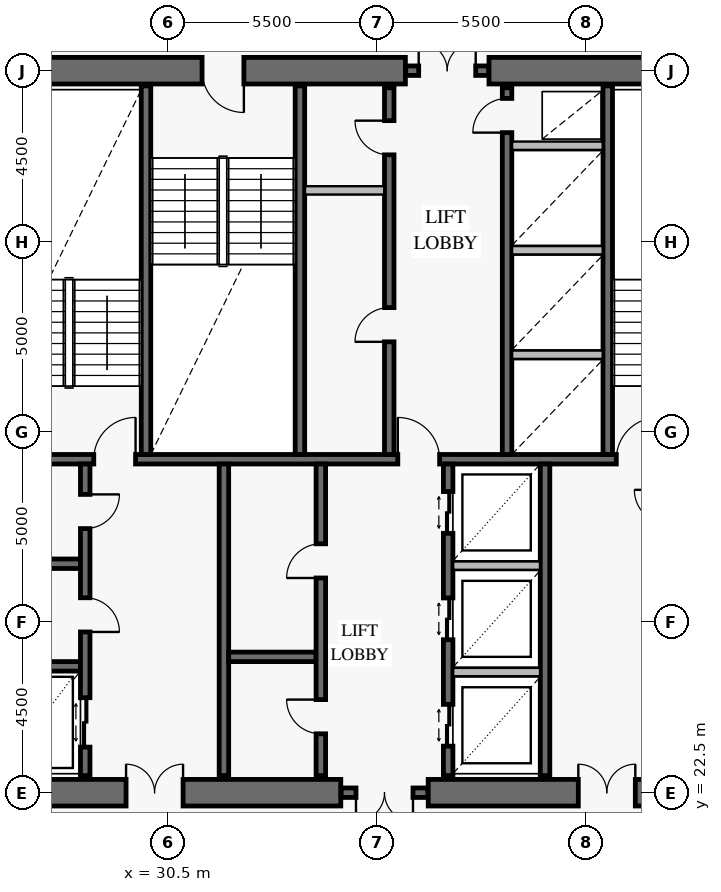
"""IFC4 building model, lengths in metres.
Left out: names, types, materials, properties, quantities, classifications, styles, units other than length and angle.
Written with IfcOpenShell. Run it as: python <this file> out.ifc"""

import sys

from ifc_helpers import new_model, si_unit, direction, frame, frame_2d, origin, place, context, subcontext, project, spatial, rectangle, extrude, element, fill, save


model = new_model("IFC4")
c1 = context("Model", 3, precision=1e-05, world=origin(), true_north=direction((0.0, 1.0)))
c2 = subcontext(c1, "Body", "Model", "MODEL_VIEW")
j1 = project(units=[si_unit("LENGTHUNIT", "METRE"), si_unit("PLANEANGLEUNIT", "RADIAN")], contexts=[c1])
p1 = place(None, origin())
s1 = spatial("IfcSite", under=j1, at=p1, CompositionType="ELEMENT")
p2 = place(p1, origin())
s2 = spatial("IfcBuilding", under=s1, at=p2, CompositionType="ELEMENT")
p3 = place(p2, frame((0.0, 0.0, 207.4)))
s3 = spatial("IfcBuildingStorey", under=s2, at=p3, CompositionType="ELEMENT", Elevation=207.4)
p4 = place(p3, frame((25.15, 22.5, 0.0), z_axis=(0.0, 0.0, 1.0), x_axis=(1.0, 0.0, 0.0)))
e1 = element("IfcWall", 1, at=p4, inside=s3, PredefinedType="SHEAR", context=c2, shape_type="SweptSolid", body=[
    extrude(rectangle(XDim=9.9, YDim=0.7, at=frame_2d((4.95, 0.0))), origin(), (0.0, 0.0, 1.0), 3.8),
])
p5 = place(p4, frame((4.25, 0.0, 0.0)))
e2 = element("IfcOpeningElement", 2, at=p5, cuts=e1, PredefinedType="OPENING", context=c2, shape_type="SweptSolid", body=[
    extrude(rectangle(XDim=1.5, YDim=2.15, at=frame_2d((0.75, 1.075))), frame((0.0, 0.362, 0.0), z_axis=(0.0, -1.0, 0.0), x_axis=(1.0, 0.0, 0.0)), (0.0, 0.0, 1.0), 0.724),
])
p6 = place(p3, frame((37.35, 22.5, 0.0), z_axis=(0.0, 0.0, 1.0), x_axis=(1.0, 0.0, 0.0)))
e3 = element("IfcWall", 3, at=p6, inside=s3, PredefinedType="SHEAR", context=c2, shape_type="SweptSolid", body=[
    extrude(rectangle(XDim=9.5, YDim=0.7, at=frame_2d((4.75, 0.0))), origin(), (0.0, 0.0, 1.0), 3.8),
])
p7 = place(p6, frame((3.95, 0.0, 0.0)))
e4 = element("IfcOpeningElement", 4, at=p7, cuts=e3, PredefinedType="OPENING", context=c2, shape_type="SweptSolid", body=[
    extrude(rectangle(XDim=1.5, YDim=2.15, at=frame_2d((0.75, 1.075))), frame((0.0, 0.362, 0.0), z_axis=(0.0, -1.0, 0.0), x_axis=(1.0, 0.0, 0.0)), (0.0, 0.0, 1.0), 0.724),
])
p8 = place(p3, frame((46.85, 41.5, 0.0), z_axis=(0.0, 0.0, 1.0), x_axis=(-1.0, 0.0, 0.0)))
e5 = element("IfcWall", 5, at=p8, inside=s3, PredefinedType="SHEAR", context=c2, shape_type="SweptSolid", body=[
    extrude(rectangle(XDim=7.9, YDim=0.7, at=frame_2d((3.95, 0.0))), origin(), (0.0, 0.0, 1.0), 3.8),
])
p9 = place(p3, frame((36.75, 41.5, 0.0), z_axis=(0.0, 0.0, 1.0), x_axis=(-1.0, 0.0, 0.0)))
e6 = element("IfcWall", 6, at=p9, inside=s3, PredefinedType="SHEAR", context=c2, shape_type="SweptSolid", body=[
    extrude(rectangle(XDim=11.6, YDim=0.7, at=frame_2d((5.8, 0.0))), origin(), (0.0, 0.0, 1.0), 3.8),
])
p10 = place(p9, frame((4.25, 0.0, 0.0)))
e7 = element("IfcOpeningElement", 7, at=p10, cuts=e6, PredefinedType="OPENING", context=c2, shape_type="SweptSolid", body=[
    extrude(rectangle(XDim=1.1, YDim=2.15, at=frame_2d((0.55, 1.075))), frame((0.0, 0.362, 0.0), z_axis=(0.0, -1.0, 0.0), x_axis=(1.0, 0.0, 0.0)), (0.0, 0.0, 1.0), 0.724),
])
p11 = place(p3, frame((35.06, 22.5, 0.0), z_axis=(0.0, 0.0, 1.0), x_axis=(1.0, 0.0, 0.0)))
e8 = element("IfcWall", 8, at=p11, inside=s3, PredefinedType="SOLIDWALL", context=c2, shape_type="SweptSolid", body=[
    extrude(rectangle(XDim=2.28, YDim=0.25, at=frame_2d((1.14, 0.0))), origin(), (0.0, 0.0, 1.0), 3.8),
])
p12 = place(p11, frame((0.39, 0.0, 0.0)))
e9 = element("IfcOpeningElement", 9, at=p12, cuts=e8, PredefinedType="OPENING", context=c2, shape_type="SweptSolid", body=[
    extrude(rectangle(XDim=1.5, YDim=2.15, at=frame_2d((0.75, 1.075))), frame((0.0, 0.137, 0.0), z_axis=(0.0, -1.0, 0.0), x_axis=(1.0, 0.0, 0.0)), (0.0, 0.0, 1.0), 0.274),
])
p13 = place(p3, frame((36.76, 41.5, 0.0), z_axis=(0.0, 0.0, 1.0), x_axis=(1.0, 0.0, 0.0)))
e10 = element("IfcWall", 10, at=p13, inside=s3, PredefinedType="SOLIDWALL", context=c2, shape_type="SweptSolid", body=[
    extrude(rectangle(XDim=2.18, YDim=0.25, at=frame_2d((1.09, 0.0))), origin(), (0.0, 0.0, 1.0), 3.8),
])
p14 = place(p13, frame((0.34, 0.0, 0.0)))
e11 = element("IfcOpeningElement", 11, at=p14, cuts=e10, PredefinedType="OPENING", context=c2, shape_type="SweptSolid", body=[
    extrude(rectangle(XDim=1.5, YDim=2.15, at=frame_2d((0.75, 1.075))), frame((0.0, 0.137, 0.0), z_axis=(0.0, -1.0, 0.0), x_axis=(1.0, 0.0, 0.0)), (0.0, 0.0, 1.0), 0.274),
])
p15 = place(p3, frame((25.95, 31.275, 0.0), z_axis=(0.0, 0.0, 1.0), x_axis=(1.0, 0.0, 0.0)))
e12 = element("IfcWall", 12, at=p15, inside=s3, PredefinedType="SOLIDWALL", context=c2, shape_type="SweptSolid", body=[
    extrude(rectangle(XDim=20.1, YDim=0.25, at=frame_2d((10.05, 0.0))), origin(), (0.0, 0.0, 1.0), 3.8),
])
p16 = place(p15, frame((2.6, 0.0, 0.0)))
e13 = element("IfcOpeningElement", 13, at=p16, cuts=e12, PredefinedType="OPENING", context=c2, shape_type="SweptSolid", body=[
    extrude(rectangle(XDim=1.1, YDim=2.15, at=frame_2d((0.55, 1.075))), frame((0.0, 0.137, 0.0), z_axis=(0.0, -1.0, 0.0), x_axis=(1.0, 0.0, 0.0)), (0.0, 0.0, 1.0), 0.274),
])
p17 = place(p15, frame((10.6, 0.0, 0.0)))
e14 = element("IfcOpeningElement", 14, at=p17, cuts=e12, PredefinedType="OPENING", context=c2, shape_type="SweptSolid", body=[
    extrude(rectangle(XDim=1.1, YDim=2.15, at=frame_2d((0.55, 1.075))), frame((0.0, 0.137, 0.0), z_axis=(0.0, -1.0, 0.0), x_axis=(1.0, 0.0, 0.0)), (0.0, 0.0, 1.0), 0.274),
])
p18 = place(p15, frame((16.35, 0.0, 0.0)))
e15 = element("IfcOpeningElement", 15, at=p18, cuts=e12, PredefinedType="OPENING", context=c2, shape_type="SweptSolid", body=[
    extrude(rectangle(XDim=1.1, YDim=2.15, at=frame_2d((0.55, 1.075))), frame((0.0, 0.137, 0.0), z_axis=(0.0, -1.0, 0.0), x_axis=(1.0, 0.0, 0.0)), (0.0, 0.0, 1.0), 0.274),
])
for number, where, z_axis, x_axis in (
    (16, (29.925, 31.4, 0.0), (0.0, 0.0, 1.0), (0.0, 1.0, 0.0)),
    (17, (33.975, 31.4, 0.0), (0.0, 0.0, 1.0), (0.0, 1.0, 0.0)),
    (18, (42.075, 31.4, 0.0), (0.0, 0.0, 1.0), (0.0, 1.0, 0.0)),
):
    element("IfcWall", number, at=place(p3, frame(where, z_axis=z_axis, x_axis=x_axis)), inside=s3, PredefinedType="SOLIDWALL", context=c2, shape_type="SweptSolid", body=[
        extrude(rectangle(XDim=9.7, YDim=0.25, at=frame_2d((4.85, 0.0))), origin(), (0.0, 0.0, 1.0), 3.8),
    ])
p19 = place(p3, frame((36.325, 31.4, 0.0), z_axis=(0.0, 0.0, 1.0), x_axis=(0.0, 1.0, 0.0)))
e19 = element("IfcWall", 19, at=p19, inside=s3, PredefinedType="SOLIDWALL", context=c2, shape_type="SweptSolid", body=[
    extrude(rectangle(XDim=9.65, YDim=0.25, at=frame_2d((4.825, 0.0))), origin(), (0.0, 0.0, 1.0), 3.8),
])
p20 = place(p19, frame((2.965, 0.0, 0.0)))
e20 = element("IfcOpeningElement", 20, at=p20, cuts=e19, PredefinedType="OPENING", context=c2, shape_type="SweptSolid", body=[
    extrude(rectangle(XDim=0.9, YDim=2.1, at=frame_2d((0.45, 1.05))), frame((0.0, 0.137, 0.0), z_axis=(0.0, -1.0, 0.0), x_axis=(1.0, 0.0, 0.0)), (0.0, 0.0, 1.0), 0.274),
])
p21 = place(p19, frame((7.885, 0.0, 0.0)))
e21 = element("IfcOpeningElement", 21, at=p21, cuts=e19, PredefinedType="OPENING", context=c2, shape_type="SweptSolid", body=[
    extrude(rectangle(XDim=0.9, YDim=2.1, at=frame_2d((0.45, 1.05))), frame((0.0, 0.137, 0.0), z_axis=(0.0, -1.0, 0.0), x_axis=(1.0, 0.0, 0.0)), (0.0, 0.0, 1.0), 0.274),
])
p22 = place(p3, frame((39.425, 31.4, 0.0), z_axis=(0.0, 0.0, 1.0), x_axis=(0.0, 1.0, 0.0)))
e22 = element("IfcWall", 22, at=p22, inside=s3, PredefinedType="SOLIDWALL", context=c2, shape_type="SweptSolid", body=[
    extrude(rectangle(XDim=9.65, YDim=0.25, at=frame_2d((4.825, 0.0))), origin(), (0.0, 0.0, 1.0), 3.8),
])
p23 = place(p22, frame((8.47, 0.0, 0.0)))
e23 = element("IfcOpeningElement", 23, at=p23, cuts=e22, PredefinedType="OPENING", context=c2, shape_type="SweptSolid", body=[
    extrude(rectangle(XDim=0.9, YDim=2.1, at=frame_2d((0.45, 1.05))), frame((0.0, 0.137, 0.0), z_axis=(0.0, -1.0, 0.0), x_axis=(1.0, 0.0, 0.0)), (0.0, 0.0, 1.0), 0.274),
])
for number, where, z_axis, x_axis in (
    (24, (25.95, 25.825, 0.0), (0.0, 0.0, 1.0), (1.0, 0.0, 0.0)),
    (25, (25.95, 28.525, 0.0), (0.0, 0.0, 1.0), (1.0, 0.0, 0.0)),
):
    element("IfcWall", number, at=place(p3, frame(where, z_axis=z_axis, x_axis=x_axis)), inside=s3, PredefinedType="SOLIDWALL", context=c2, shape_type="SweptSolid", body=[
        extrude(rectangle(XDim=2.25, YDim=0.25, at=frame_2d((1.125, 0.0))), origin(), (0.0, 0.0, 1.0), 3.8),
    ])
p24 = place(p3, frame((28.325, 22.95, 0.0), z_axis=(0.0, 0.0, 1.0), x_axis=(0.0, 1.0, 0.0)))
e26 = element("IfcWall", 26, at=p24, inside=s3, PredefinedType="SOLIDWALL", context=c2, shape_type="SweptSolid", body=[
    extrude(rectangle(XDim=8.2, YDim=0.25, at=frame_2d((4.1, 0.0))), origin(), (0.0, 0.0, 1.0), 3.8),
])
p25 = place(p24, frame((0.75, 0.0, 0.0)))
e27 = element("IfcOpeningElement", 27, at=p25, cuts=e26, PredefinedType="OPENING", context=c2, shape_type="SweptSolid", body=[
    extrude(rectangle(XDim=1.3, YDim=2.3, at=frame_2d((0.65, 1.15))), frame((0.0, 0.137, 0.0), z_axis=(0.0, -1.0, 0.0), x_axis=(1.0, 0.0, 0.0)), (0.0, 0.0, 1.0), 0.274),
])
p26 = place(p24, frame((3.78, 0.0, 0.0)))
e28 = element("IfcOpeningElement", 28, at=p26, cuts=e26, PredefinedType="OPENING", context=c2, shape_type="SweptSolid", body=[
    extrude(rectangle(XDim=0.9, YDim=2.1, at=frame_2d((0.45, 1.05))), frame((0.0, 0.137, 0.0), z_axis=(0.0, -1.0, 0.0), x_axis=(1.0, 0.0, 0.0)), (0.0, 0.0, 1.0), 0.274),
])
p27 = place(p24, frame((6.5, 0.0, 0.0)))
e29 = element("IfcOpeningElement", 29, at=p27, cuts=e26, PredefinedType="OPENING", context=c2, shape_type="SweptSolid", body=[
    extrude(rectangle(XDim=0.9, YDim=2.1, at=frame_2d((0.45, 1.05))), frame((0.0, 0.137, 0.0), z_axis=(0.0, -1.0, 0.0), x_axis=(1.0, 0.0, 0.0)), (0.0, 0.0, 1.0), 0.274),
])
p28 = place(p3, frame((31.975, 22.95, 0.0), z_axis=(0.0, 0.0, 1.0), x_axis=(0.0, 1.0, 0.0)))
e30 = element("IfcWall", 30, at=p28, inside=s3, PredefinedType="SOLIDWALL", context=c2, shape_type="SweptSolid", body=[
    extrude(rectangle(XDim=8.2, YDim=0.25, at=frame_2d((4.1, 0.0))), origin(), (0.0, 0.0, 1.0), 3.8),
])
p29 = place(p3, frame((32.1, 26.075, 0.0), z_axis=(0.0, 0.0, 1.0), x_axis=(1.0, 0.0, 0.0)))
e31 = element("IfcWall", 31, at=p29, inside=s3, PredefinedType="SOLIDWALL", context=c2, shape_type="SweptSolid", body=[
    extrude(rectangle(XDim=2.3, YDim=0.25, at=frame_2d((1.15, 0.0))), origin(), (0.0, 0.0, 1.0), 3.8),
])
p30 = place(p3, frame((34.525, 22.95, 0.0), z_axis=(0.0, 0.0, 1.0), x_axis=(0.0, 1.0, 0.0)))
e32 = element("IfcWall", 32, at=p30, inside=s3, PredefinedType="SOLIDWALL", context=c2, shape_type="SweptSolid", body=[
    extrude(rectangle(XDim=8.2, YDim=0.25, at=frame_2d((4.1, 0.0))), origin(), (0.0, 0.0, 1.0), 3.8),
])
p31 = place(p30, frame((1.1, 0.0, 0.0)))
e33 = element("IfcOpeningElement", 33, at=p31, cuts=e32, PredefinedType="OPENING", context=c2, shape_type="SweptSolid", body=[
    extrude(rectangle(XDim=0.9, YDim=2.1, at=frame_2d((0.45, 1.05))), frame((0.0, 0.137, 0.0), z_axis=(0.0, -1.0, 0.0), x_axis=(1.0, 0.0, 0.0)), (0.0, 0.0, 1.0), 0.274),
])
p32 = place(p30, frame((5.2, 0.0, 0.0)))
e34 = element("IfcOpeningElement", 34, at=p32, cuts=e32, PredefinedType="OPENING", context=c2, shape_type="SweptSolid", body=[
    extrude(rectangle(XDim=0.9, YDim=2.1, at=frame_2d((0.45, 1.05))), frame((0.0, 0.137, 0.0), z_axis=(0.0, -1.0, 0.0), x_axis=(1.0, 0.0, 0.0)), (0.0, 0.0, 1.0), 0.274),
])
p33 = place(p3, frame((37.875, 22.95, 0.0), z_axis=(0.0, 0.0, 1.0), x_axis=(0.0, 1.0, 0.0)))
e35 = element("IfcWall", 35, at=p33, inside=s3, PredefinedType="SOLIDWALL", context=c2, shape_type="SweptSolid", body=[
    extrude(rectangle(XDim=8.2, YDim=0.25, at=frame_2d((4.1, 0.0))), origin(), (0.0, 0.0, 1.0), 3.8),
])
p34 = place(p33, frame((0.775, 0.0, 0.0)))
e36 = element("IfcOpeningElement", 36, at=p34, cuts=e35, PredefinedType="OPENING", context=c2, shape_type="SweptSolid", body=[
    extrude(rectangle(XDim=1.1, YDim=2.2, at=frame_2d((0.55, 1.1))), frame((0.0, 0.137, 0.0), z_axis=(0.0, -1.0, 0.0), x_axis=(1.0, 0.0, 0.0)), (0.0, 0.0, 1.0), 0.274),
])
p35 = place(p33, frame((3.575, 0.0, 0.0)))
e37 = element("IfcOpeningElement", 37, at=p35, cuts=e35, PredefinedType="OPENING", context=c2, shape_type="SweptSolid", body=[
    extrude(rectangle(XDim=1.1, YDim=2.2, at=frame_2d((0.55, 1.1))), frame((0.0, 0.137, 0.0), z_axis=(0.0, -1.0, 0.0), x_axis=(1.0, 0.0, 0.0)), (0.0, 0.0, 1.0), 0.274),
])
p36 = place(p33, frame((6.375, 0.0, 0.0)))
e38 = element("IfcOpeningElement", 38, at=p36, cuts=e35, PredefinedType="OPENING", context=c2, shape_type="SweptSolid", body=[
    extrude(rectangle(XDim=1.1, YDim=2.2, at=frame_2d((0.55, 1.1))), frame((0.0, 0.137, 0.0), z_axis=(0.0, -1.0, 0.0), x_axis=(1.0, 0.0, 0.0)), (0.0, 0.0, 1.0), 0.274),
])
p37 = place(p3, frame((40.425, 22.95, 0.0), z_axis=(0.0, 0.0, 1.0), x_axis=(0.0, 1.0, 0.0)))
e39 = element("IfcWall", 39, at=p37, inside=s3, PredefinedType="SOLIDWALL", context=c2, shape_type="SweptSolid", body=[
    extrude(rectangle(XDim=8.2, YDim=0.25, at=frame_2d((4.1, 0.0))), origin(), (0.0, 0.0, 1.0), 3.8),
])
p38 = place(p3, frame((34.108, 38.35, 0.0), z_axis=(0.0, 0.0, 1.0), x_axis=(1.0, 0.0, 0.0)))
e40 = element("IfcWall", 40, at=p38, inside=s3, PredefinedType="PARTITIONING", context=c2, shape_type="SweptSolid", body=[
    extrude(rectangle(XDim=2.084, YDim=0.22, at=frame_2d((1.042, 0.0))), origin(), (0.0, 0.0, 1.0), 3.55),
])
for number, where, z_axis, x_axis in (
    (41, (39.558, 34.025, 0.0), (0.0, 0.0, 1.0), (1.0, 0.0, 0.0)),
    (42, (39.558, 36.775, 0.0), (0.0, 0.0, 1.0), (1.0, 0.0, 0.0)),
    (43, (39.558, 39.525, 0.0), (0.0, 0.0, 1.0), (1.0, 0.0, 0.0)),
):
    element("IfcWall", number, at=place(p3, frame(where, z_axis=z_axis, x_axis=x_axis)), inside=s3, PredefinedType="PARTITIONING", context=c2, shape_type="SweptSolid", body=[
        extrude(rectangle(XDim=2.384, YDim=0.22, at=frame_2d((1.192, 0.0))), origin(), (0.0, 0.0, 1.0), 3.55),
    ])
for number, where, z_axis, x_axis in (
    (44, (38.008, 25.675, 0.0), (0.0, 0.0, 1.0), (1.0, 0.0, 0.0)),
    (45, (38.008, 28.475, 0.0), (0.0, 0.0, 1.0), (1.0, 0.0, 0.0)),
):
    element("IfcWall", number, at=place(p3, frame(where, z_axis=z_axis, x_axis=x_axis)), inside=s3, PredefinedType="PARTITIONING", context=c2, shape_type="SweptSolid", body=[
        extrude(rectangle(XDim=2.284, YDim=0.22, at=frame_2d((1.142, 0.0))), origin(), (0.0, 0.0, 1.0), 3.55),
    ])
p39 = place(p10, origin())
e46 = element("IfcDoor", 46, at=p39, inside=s3, OperationType="SINGLE_SWING_LEFT", PredefinedType="USERDEFINED", context=c2, shape_type="SweptSolid", body=[
    extrude(rectangle(XDim=1.1, YDim=2.15, at=frame_2d((0.55, 1.075))), frame((0.0, 0.025, 0.0), z_axis=(0.0, -1.0, 0.0), x_axis=(1.0, 0.0, 0.0)), (0.0, 0.0, 1.0), 0.05),
])
fill(e7, e46)
p40 = place(p5, origin())
e47 = element("IfcDoor", 47, at=p40, inside=s3, OperationType="DOUBLE_DOOR_SINGLE_SWING", PredefinedType="DOOR", context=c2, shape_type="SweptSolid", body=[
    extrude(rectangle(XDim=1.5, YDim=2.15, at=frame_2d((0.75, 1.075))), frame((0.0, 0.025, 0.0), z_axis=(0.0, -1.0, 0.0), x_axis=(1.0, 0.0, 0.0)), (0.0, 0.0, 1.0), 0.05),
])
fill(e2, e47)
p41 = place(p7, origin())
e48 = element("IfcDoor", 48, at=p41, inside=s3, OperationType="DOUBLE_DOOR_SINGLE_SWING", PredefinedType="DOOR", context=c2, shape_type="SweptSolid", body=[
    extrude(rectangle(XDim=1.5, YDim=2.15, at=frame_2d((0.75, 1.075))), frame((0.0, 0.025, 0.0), z_axis=(0.0, -1.0, 0.0), x_axis=(1.0, 0.0, 0.0)), (0.0, 0.0, 1.0), 0.05),
])
fill(e4, e48)
p42 = place(p12, frame((1.5, 0.0, 0.0), z_axis=(0.0, 0.0, 1.0), x_axis=(-1.0, 0.0, 0.0)))
e49 = element("IfcDoor", 49, at=p42, inside=s3, OperationType="DOUBLE_DOOR_SINGLE_SWING", PredefinedType="DOOR", context=c2, shape_type="SweptSolid", body=[
    extrude(rectangle(XDim=1.5, YDim=2.15, at=frame_2d((0.75, 1.075))), frame((0.0, 0.025, 0.0), z_axis=(0.0, -1.0, 0.0), x_axis=(1.0, 0.0, 0.0)), (0.0, 0.0, 1.0), 0.05),
])
fill(e9, e49)
p43 = place(p14, origin())
e50 = element("IfcDoor", 50, at=p43, inside=s3, OperationType="DOUBLE_DOOR_SINGLE_SWING", PredefinedType="DOOR", context=c2, shape_type="SweptSolid", body=[
    extrude(rectangle(XDim=1.5, YDim=2.15, at=frame_2d((0.75, 1.075))), frame((0.0, 0.025, 0.0), z_axis=(0.0, -1.0, 0.0), x_axis=(1.0, 0.0, 0.0)), (0.0, 0.0, 1.0), 0.05),
])
fill(e11, e50)
p44 = place(p16, origin())
e51 = element("IfcDoor", 51, at=p44, inside=s3, OperationType="SINGLE_SWING_RIGHT", PredefinedType="USERDEFINED", context=c2, shape_type="SweptSolid", body=[
    extrude(rectangle(XDim=1.1, YDim=2.15, at=frame_2d((0.55, 1.075))), frame((0.0, 0.025, 0.0), z_axis=(0.0, -1.0, 0.0), x_axis=(1.0, 0.0, 0.0)), (0.0, 0.0, 1.0), 0.05),
])
fill(e13, e51)
p45 = place(p17, origin())
e52 = element("IfcDoor", 52, at=p45, inside=s3, OperationType="SINGLE_SWING_LEFT", PredefinedType="USERDEFINED", context=c2, shape_type="SweptSolid", body=[
    extrude(rectangle(XDim=1.1, YDim=2.15, at=frame_2d((0.55, 1.075))), frame((0.0, 0.025, 0.0), z_axis=(0.0, -1.0, 0.0), x_axis=(1.0, 0.0, 0.0)), (0.0, 0.0, 1.0), 0.05),
])
fill(e14, e52)
p46 = place(p18, origin())
e53 = element("IfcDoor", 53, at=p46, inside=s3, OperationType="SINGLE_SWING_RIGHT", PredefinedType="USERDEFINED", context=c2, shape_type="SweptSolid", body=[
    extrude(rectangle(XDim=1.1, YDim=2.15, at=frame_2d((0.55, 1.075))), frame((0.0, 0.025, 0.0), z_axis=(0.0, -1.0, 0.0), x_axis=(1.0, 0.0, 0.0)), (0.0, 0.0, 1.0), 0.05),
])
fill(e15, e53)
p47 = place(p20, origin())
e54 = element("IfcDoor", 54, at=p47, inside=s3, OperationType="SINGLE_SWING_LEFT", PredefinedType="DOOR", context=c2, shape_type="SweptSolid", body=[
    extrude(rectangle(XDim=0.9, YDim=2.1, at=frame_2d((0.45, 1.05))), frame((0.0, 0.025, 0.0), z_axis=(0.0, -1.0, 0.0), x_axis=(1.0, 0.0, 0.0)), (0.0, 0.0, 1.0), 0.05),
])
fill(e20, e54)
p48 = place(p21, origin())
e55 = element("IfcDoor", 55, at=p48, inside=s3, OperationType="SINGLE_SWING_RIGHT", PredefinedType="DOOR", context=c2, shape_type="SweptSolid", body=[
    extrude(rectangle(XDim=0.9, YDim=2.1, at=frame_2d((0.45, 1.05))), frame((0.0, 0.025, 0.0), z_axis=(0.0, -1.0, 0.0), x_axis=(1.0, 0.0, 0.0)), (0.0, 0.0, 1.0), 0.05),
])
fill(e21, e55)
p49 = place(p23, origin())
e56 = element("IfcDoor", 56, at=p49, inside=s3, OperationType="SINGLE_SWING_LEFT", PredefinedType="DOOR", context=c2, shape_type="SweptSolid", body=[
    extrude(rectangle(XDim=0.9, YDim=2.1, at=frame_2d((0.45, 1.05))), frame((0.0, 0.025, 0.0), z_axis=(0.0, -1.0, 0.0), x_axis=(1.0, 0.0, 0.0)), (0.0, 0.0, 1.0), 0.05),
])
fill(e23, e56)
p50 = place(p25, frame((1.3, 0.0, 0.0), z_axis=(0.0, 0.0, 1.0), x_axis=(-1.0, 0.0, 0.0)))
e57 = element("IfcDoor", 57, at=p50, inside=s3, OperationType="DOUBLE_DOOR_SLIDING", PredefinedType="DOOR", context=c2, shape_type="SweptSolid", body=[
    extrude(rectangle(XDim=1.3, YDim=2.3, at=frame_2d((0.65, 1.15))), frame((0.0, 0.025, 0.0), z_axis=(0.0, -1.0, 0.0), x_axis=(1.0, 0.0, 0.0)), (0.0, 0.0, 1.0), 0.05),
])
fill(e27, e57)
p51 = place(p26, frame((0.9, 0.0, 0.0), z_axis=(0.0, 0.0, 1.0), x_axis=(-1.0, 0.0, 0.0)))
e58 = element("IfcDoor", 58, at=p51, inside=s3, OperationType="SINGLE_SWING_RIGHT", PredefinedType="DOOR", context=c2, shape_type="SweptSolid", body=[
    extrude(rectangle(XDim=0.9, YDim=2.1, at=frame_2d((0.45, 1.05))), frame((0.0, 0.025, 0.0), z_axis=(0.0, -1.0, 0.0), x_axis=(1.0, 0.0, 0.0)), (0.0, 0.0, 1.0), 0.05),
])
fill(e28, e58)
p52 = place(p27, frame((0.9, 0.0, 0.0), z_axis=(0.0, 0.0, 1.0), x_axis=(-1.0, 0.0, 0.0)))
e59 = element("IfcDoor", 59, at=p52, inside=s3, OperationType="SINGLE_SWING_LEFT", PredefinedType="DOOR", context=c2, shape_type="SweptSolid", body=[
    extrude(rectangle(XDim=0.9, YDim=2.1, at=frame_2d((0.45, 1.05))), frame((0.0, 0.025, 0.0), z_axis=(0.0, -1.0, 0.0), x_axis=(1.0, 0.0, 0.0)), (0.0, 0.0, 1.0), 0.05),
])
fill(e29, e59)
p53 = place(p31, origin())
e60 = element("IfcDoor", 60, at=p53, inside=s3, OperationType="SINGLE_SWING_RIGHT", PredefinedType="DOOR", context=c2, shape_type="SweptSolid", body=[
    extrude(rectangle(XDim=0.9, YDim=2.1, at=frame_2d((0.45, 1.05))), frame((0.0, 0.025, 0.0), z_axis=(0.0, -1.0, 0.0), x_axis=(1.0, 0.0, 0.0)), (0.0, 0.0, 1.0), 0.05),
])
fill(e33, e60)
p54 = place(p32, origin())
e61 = element("IfcDoor", 61, at=p54, inside=s3, OperationType="SINGLE_SWING_LEFT", PredefinedType="DOOR", context=c2, shape_type="SweptSolid", body=[
    extrude(rectangle(XDim=0.9, YDim=2.1, at=frame_2d((0.45, 1.05))), frame((0.0, 0.025, 0.0), z_axis=(0.0, -1.0, 0.0), x_axis=(1.0, 0.0, 0.0)), (0.0, 0.0, 1.0), 0.05),
])
fill(e34, e61)
p55 = place(p34, origin())
e62 = element("IfcDoor", 62, at=p55, inside=s3, OperationType="DOUBLE_DOOR_SLIDING", PredefinedType="DOOR", context=c2, shape_type="SweptSolid", body=[
    extrude(rectangle(XDim=1.1, YDim=2.2, at=frame_2d((0.55, 1.1))), frame((0.0, 0.025, 0.0), z_axis=(0.0, -1.0, 0.0), x_axis=(1.0, 0.0, 0.0)), (0.0, 0.0, 1.0), 0.05),
])
fill(e36, e62)
p56 = place(p35, origin())
e63 = element("IfcDoor", 63, at=p56, inside=s3, OperationType="DOUBLE_DOOR_SLIDING", PredefinedType="DOOR", context=c2, shape_type="SweptSolid", body=[
    extrude(rectangle(XDim=1.1, YDim=2.2, at=frame_2d((0.55, 1.1))), frame((0.0, 0.025, 0.0), z_axis=(0.0, -1.0, 0.0), x_axis=(1.0, 0.0, 0.0)), (0.0, 0.0, 1.0), 0.05),
])
fill(e37, e63)
p57 = place(p36, origin())
e64 = element("IfcDoor", 64, at=p57, inside=s3, OperationType="DOUBLE_DOOR_SLIDING", PredefinedType="DOOR", context=c2, shape_type="SweptSolid", body=[
    extrude(rectangle(XDim=1.1, YDim=2.2, at=frame_2d((0.55, 1.1))), frame((0.0, 0.025, 0.0), z_axis=(0.0, -1.0, 0.0), x_axis=(1.0, 0.0, 0.0)), (0.0, 0.0, 1.0), 0.05),
])
fill(e38, e64)
save(model, sys.argv[1])
